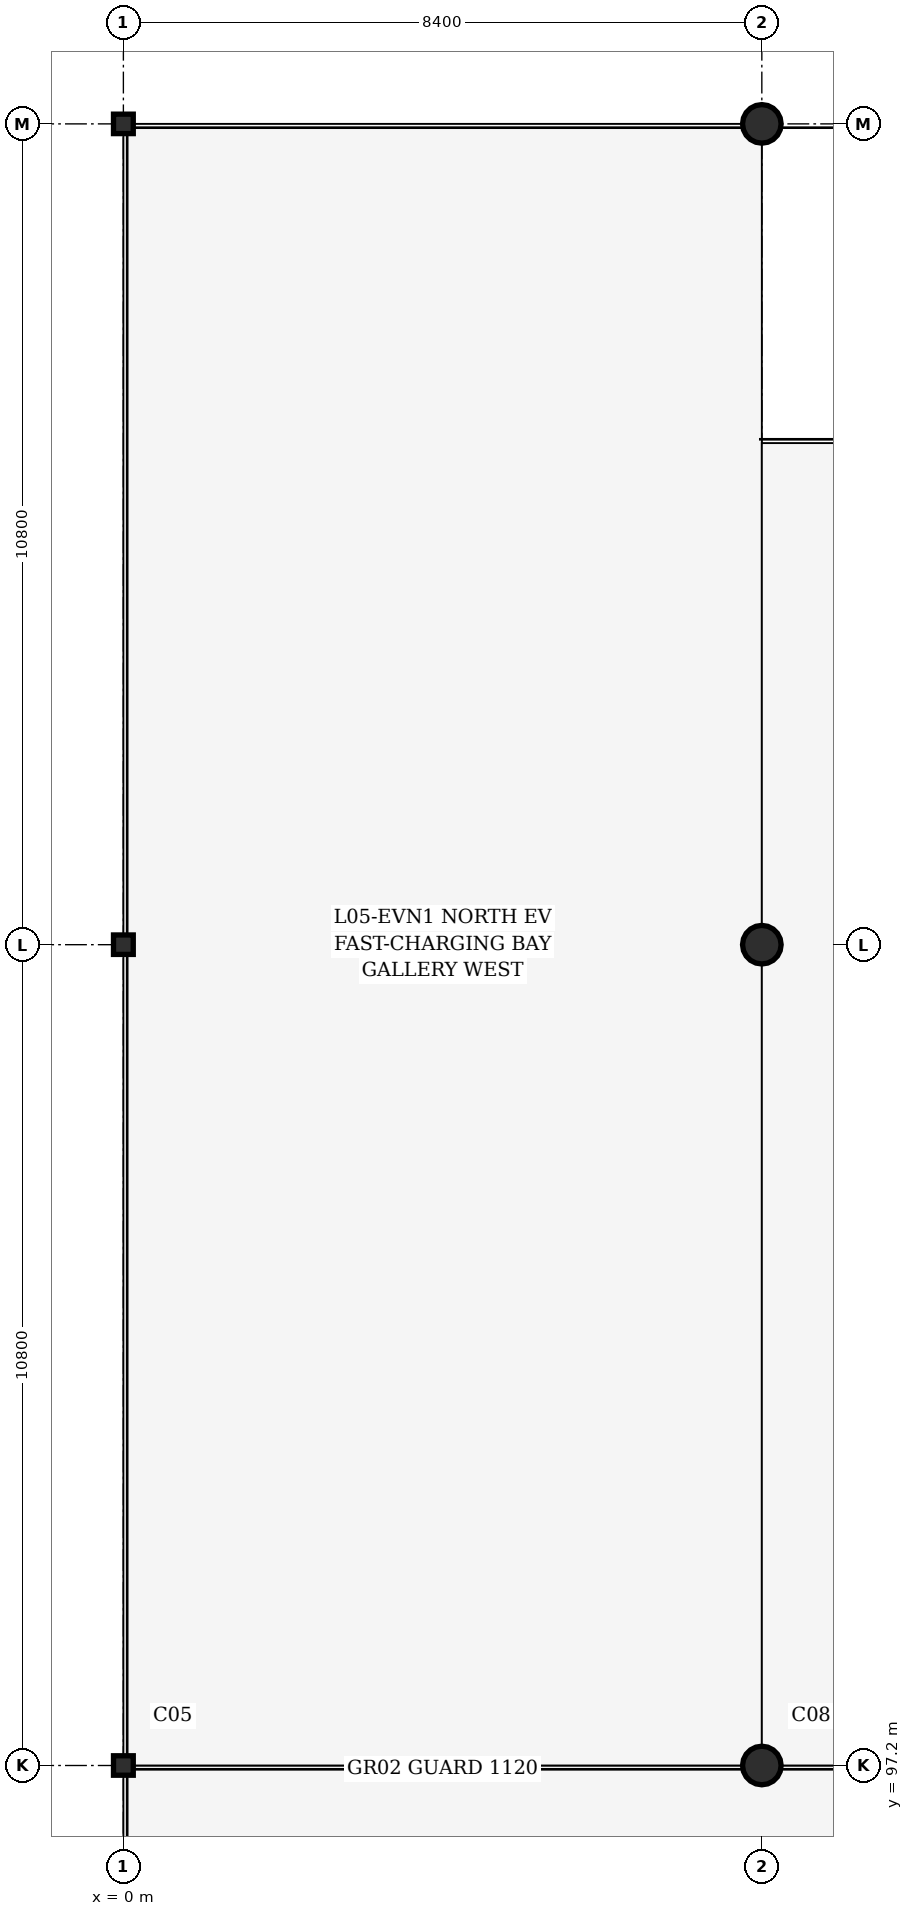
"""IFC4 building model, lengths in metres.
Left out: names, types, materials, properties, quantities, classifications, styles, units other than length and angle.
Written with IfcOpenShell. Run it as: python <this file> out.ifc"""

import sys

from ifc_helpers import new_model, si_unit, direction, frame, origin, origin_2d, place, context, subcontext, project, spatial, hollow_circle, i_section, extrude, element, save


model = new_model("IFC4")
c1 = context("Model", 3, precision=1e-05, world=origin(), true_north=direction((0.0, 1.0)))
c2 = subcontext(c1, "Body", "Model", "MODEL_VIEW")
j1 = project(units=[si_unit("LENGTHUNIT", "METRE"), si_unit("PLANEANGLEUNIT", "RADIAN")], contexts=[c1])
p1 = place(None, origin())
s1 = spatial("IfcSite", under=j1, at=p1, CompositionType="ELEMENT")
p2 = place(p1, origin())
s2 = spatial("IfcBuilding", under=s1, at=p2, CompositionType="ELEMENT")
p3 = place(p2, frame((0.0, 0.0, 19.8)))
s3 = spatial("IfcBuildingStorey", under=s2, at=p3, CompositionType="ELEMENT", Elevation=19.8)
for number, where, z_axis, x_axis in (
    (1, (0.0, 97.2, 0.0), (0.0, 0.0, 1.0), (1.0, 0.0, 0.0)),
    (2, (0.0, 108.0, 0.0), (0.0, 0.0, 1.0), (1.0, 0.0, 0.0)),
    (3, (0.0, 118.8, 0.0), (0.0, 0.0, 1.0), (1.0, 0.0, 0.0)),
):
    element("IfcColumn", number, at=place(p3, frame(where, z_axis=z_axis, x_axis=x_axis)), inside=s3, PredefinedType="COLUMN", context=c2, shape_type="SweptSolid", body=[
        extrude(i_section(OverallWidth=0.256, OverallDepth=0.26, WebThickness=0.01, FlangeThickness=0.017, FilletRadius=0.013, at=origin_2d()), origin(), (0.0, 0.0, 1.0), 3.6),
    ])
for number, where, z_axis, x_axis in (
    (4, (8.4, 97.2, 0.0), (0.0, 0.0, 1.0), (1.0, 0.0, 0.0)),
    (5, (8.4, 108.0, 0.0), (0.0, 0.0, 1.0), (1.0, 0.0, 0.0)),
    (6, (8.4, 118.8, 0.0), (0.0, 0.0, 1.0), (1.0, 0.0, 0.0)),
):
    element("IfcColumn", number, at=place(p3, frame(where, z_axis=z_axis, x_axis=x_axis)), inside=s3, PredefinedType="COLUMN", context=c2, shape_type="SweptSolid", body=[
        extrude(hollow_circle(Radius=0.254, WallThickness=0.016, at=origin_2d()), origin(), (0.0, 0.0, 1.0), 3.6),
    ])
save(model, sys.argv[1])
